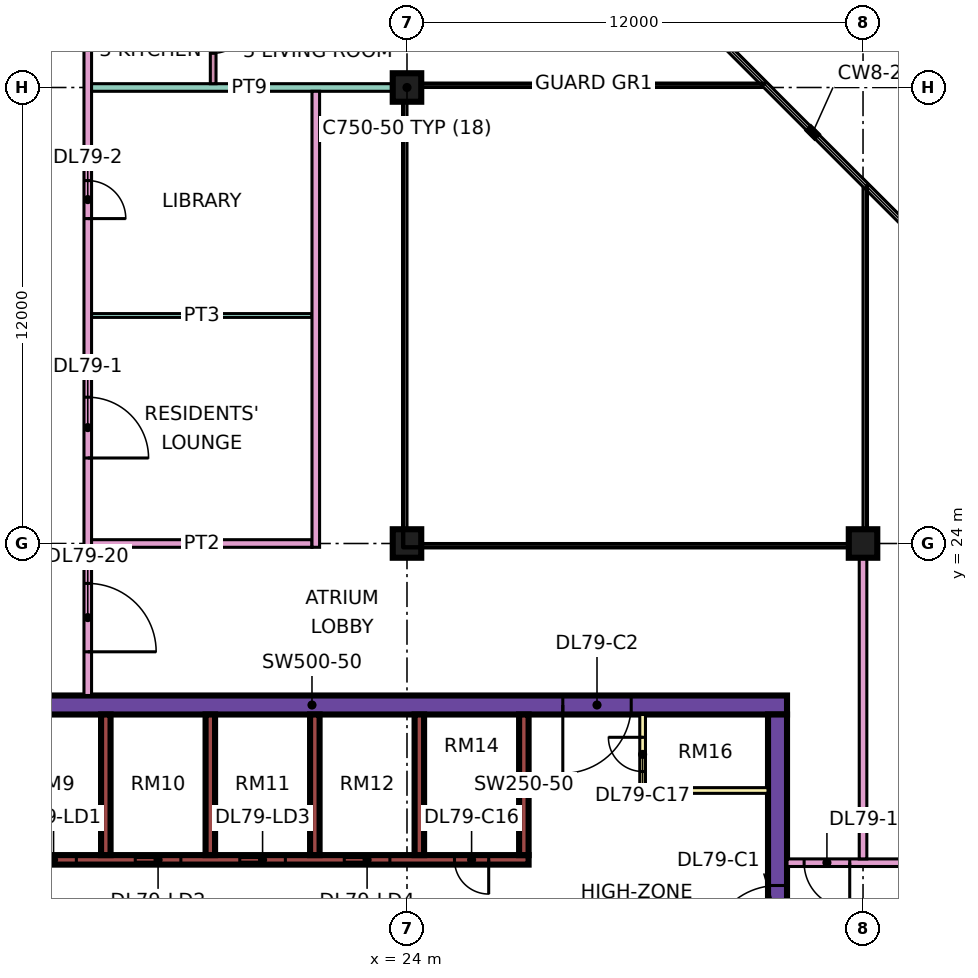
"""IFC4 building model, lengths in metres.
Left out: names, types, materials, properties, quantities, classifications, styles, units other than length and angle.
Written with IfcOpenShell. Run it as: python <this file> out.ifc"""

import sys

from ifc_helpers import new_model, si_unit, direction, frame, frame_2d, origin, origin_2d, place, context, subcontext, project, spatial, rectangle, extrude, element, fill, save


model = new_model("IFC4")
c1 = context("Model", 3, precision=1e-05, world=origin(), true_north=direction((0.0, 1.0)))
c2 = subcontext(c1, "Body", "Model", "MODEL_VIEW")
j1 = project(units=[si_unit("LENGTHUNIT", "METRE"), si_unit("PLANEANGLEUNIT", "RADIAN")], contexts=[c1])
p1 = place(None, origin())
s1 = spatial("IfcSite", under=j1, at=p1, CompositionType="ELEMENT")
p2 = place(p1, origin())
s2 = spatial("IfcBuilding", under=s1, at=p2, CompositionType="ELEMENT")
p3 = place(p2, frame((0.0, 0.0, 342.65)))
s3 = spatial("IfcBuildingStorey", under=s2, at=p3, CompositionType="ELEMENT", Elevation=342.65)
for number, where, z_axis, x_axis in (
    (1, (24.0, 24.0, 0.0), (0.0, 0.0, 1.0), (1.0, 0.0, 0.0)),
    (2, (24.0, 36.0, 0.0), (0.0, 0.0, 1.0), (1.0, 0.0, 0.0)),
    (3, (36.0, 24.0, 0.0), (0.0, 0.0, 1.0), (1.0, 0.0, 0.0)),
):
    element("IfcColumn", number, at=place(p3, frame(where, z_axis=z_axis, x_axis=x_axis)), inside=s3, PredefinedType="COLUMN", context=c2, shape_type="SweptSolid", body=[
        extrude(rectangle(XDim=0.75, YDim=0.75, at=origin_2d()), origin(), (0.0, 0.0, 1.0), 3.75),
    ])
p4 = place(p3, frame((9.0, 19.75, 0.0), z_axis=(0.0, 0.0, 1.0), x_axis=(1.0, 0.0, 0.0)))
e4 = element("IfcWall", 4, at=p4, inside=s3, PredefinedType="SHEAR", context=c2, shape_type="SweptSolid", body=[
    extrude(rectangle(XDim=25.0, YDim=0.5, at=frame_2d((12.5, 0.0))), origin(), (0.0, 0.0, 1.0), 3.75),
])
p5 = place(p4, frame((19.1, 0.0, 0.0)))
e5 = element("IfcOpeningElement", 5, at=p5, cuts=e4, PredefinedType="OPENING", context=c2, shape_type="SweptSolid", body=[
    extrude(rectangle(XDim=1.8, YDim=2.4, at=frame_2d((0.9, 1.2))), frame((0.0, 0.26, 0.0), z_axis=(0.0, -1.0, 0.0), x_axis=(1.0, 0.0, 0.0)), (0.0, 0.0, 1.0), 0.52),
])
p6 = place(p3, frame((33.75, 7.5, 0.0), z_axis=(0.0, 0.0, 1.0), x_axis=(0.0, 1.0, 0.0)))
e6 = element("IfcWall", 6, at=p6, inside=s3, PredefinedType="SHEAR", context=c2, shape_type="SweptSolid", body=[
    extrude(rectangle(XDim=12.0, YDim=0.5, at=frame_2d((6.0, 0.0))), origin(), (0.0, 0.0, 1.0), 3.75),
])
p7 = place(p6, frame((5.7, 0.0, 0.0)))
e7 = element("IfcOpeningElement", 7, at=p7, cuts=e6, PredefinedType="OPENING", context=c2, shape_type="SweptSolid", body=[
    extrude(rectangle(XDim=1.8, YDim=2.4, at=frame_2d((0.9, 1.2))), frame((0.0, 0.26, 0.0), z_axis=(0.0, -1.0, 0.0), x_axis=(1.0, 0.0, 0.0)), (0.0, 0.0, 1.0), 0.52),
])
p8 = place(p3, frame((13.45, 15.675, 0.0), z_axis=(0.0, 0.0, 1.0), x_axis=(1.0, 0.0, 0.0)))
e8 = element("IfcWall", 8, at=p8, inside=s3, PredefinedType="SHEAR", context=c2, shape_type="SweptSolid", body=[
    extrude(rectangle(XDim=13.75, YDim=0.25, at=frame_2d((6.875, 0.0))), origin(), (0.0, 0.0, 1.0), 3.75),
])
p9 = place(p8, frame((0.65, 0.0, 0.0)))
e9 = element("IfcOpeningElement", 9, at=p9, cuts=e8, PredefinedType="OPENING", context=c2, shape_type="SweptSolid", body=[
    extrude(rectangle(XDim=1.2, YDim=2.2, at=frame_2d((0.6, 1.1))), frame((0.0, 0.135, 0.0), z_axis=(0.0, -1.0, 0.0), x_axis=(1.0, 0.0, 0.0)), (0.0, 0.0, 1.0), 0.27),
])
p10 = place(p8, frame((3.4, 0.0, 0.0)))
e10 = element("IfcOpeningElement", 10, at=p10, cuts=e8, PredefinedType="OPENING", context=c2, shape_type="SweptSolid", body=[
    extrude(rectangle(XDim=1.2, YDim=2.2, at=frame_2d((0.6, 1.1))), frame((0.0, 0.135, 0.0), z_axis=(0.0, -1.0, 0.0), x_axis=(1.0, 0.0, 0.0)), (0.0, 0.0, 1.0), 0.27),
])
p11 = place(p8, frame((6.15, 0.0, 0.0)))
e11 = element("IfcOpeningElement", 11, at=p11, cuts=e8, PredefinedType="OPENING", context=c2, shape_type="SweptSolid", body=[
    extrude(rectangle(XDim=1.2, YDim=2.2, at=frame_2d((0.6, 1.1))), frame((0.0, 0.135, 0.0), z_axis=(0.0, -1.0, 0.0), x_axis=(1.0, 0.0, 0.0)), (0.0, 0.0, 1.0), 0.27),
])
p12 = place(p8, frame((8.9, 0.0, 0.0)))
e12 = element("IfcOpeningElement", 12, at=p12, cuts=e8, PredefinedType="OPENING", context=c2, shape_type="SweptSolid", body=[
    extrude(rectangle(XDim=1.2, YDim=2.2, at=frame_2d((0.6, 1.1))), frame((0.0, 0.135, 0.0), z_axis=(0.0, -1.0, 0.0), x_axis=(1.0, 0.0, 0.0)), (0.0, 0.0, 1.0), 0.27),
])
p13 = place(p8, frame((11.8, 0.0, 0.0)))
e13 = element("IfcOpeningElement", 13, at=p13, cuts=e8, PredefinedType="OPENING", context=c2, shape_type="SweptSolid", body=[
    extrude(rectangle(XDim=0.9, YDim=2.1, at=frame_2d((0.45, 1.05))), frame((0.0, 0.135, 0.0), z_axis=(0.0, -1.0, 0.0), x_axis=(1.0, 0.0, 0.0)), (0.0, 0.0, 1.0), 0.27),
])
for number, where, z_axis, x_axis in (
    (14, (16.075, 15.8, 0.0), (0.0, 0.0, 1.0), (0.0, 1.0, 0.0)),
    (15, (18.825, 15.8, 0.0), (0.0, 0.0, 1.0), (0.0, 1.0, 0.0)),
    (16, (21.575, 15.8, 0.0), (0.0, 0.0, 1.0), (0.0, 1.0, 0.0)),
    (17, (24.325, 15.8, 0.0), (0.0, 0.0, 1.0), (0.0, 1.0, 0.0)),
    (18, (27.075, 15.8, 0.0), (0.0, 0.0, 1.0), (0.0, 1.0, 0.0)),
):
    element("IfcWall", number, at=place(p3, frame(where, z_axis=z_axis, x_axis=x_axis)), inside=s3, PredefinedType="SHEAR", context=c2, shape_type="SweptSolid", body=[
        extrude(rectangle(XDim=3.7, YDim=0.25, at=frame_2d((1.85, 0.0))), origin(), (0.0, 0.0, 1.0), 3.75),
    ])
p14 = place(p3, frame((30.2, 17.5, 0.0), z_axis=(0.0, 0.0, 1.0), x_axis=(0.0, 1.0, 0.0)))
e19 = element("IfcWall", 19, at=p14, inside=s3, PredefinedType="PARTITIONING", context=c2, shape_type="SweptSolid", body=[
    extrude(rectangle(XDim=2.0, YDim=0.15, at=frame_2d((1.0, 0.0))), origin(), (0.0, 0.0, 1.0), 3.35),
])
p15 = place(p14, frame((0.5, 0.0, 0.0)))
e20 = element("IfcOpeningElement", 20, at=p15, cuts=e19, PredefinedType="OPENING", context=c2, shape_type="SweptSolid", body=[
    extrude(rectangle(XDim=0.9, YDim=2.1, at=frame_2d((0.45, 1.05))), frame((0.0, 0.085, 0.0), z_axis=(0.0, -1.0, 0.0), x_axis=(1.0, 0.0, 0.0)), (0.0, 0.0, 1.0), 0.17),
])
p16 = place(p3, frame((30.2, 17.5, 0.0), z_axis=(0.0, 0.0, 1.0), x_axis=(1.0, 0.0, 0.0)))
e21 = element("IfcWall", 21, at=p16, inside=s3, PredefinedType="PARTITIONING", context=c2, shape_type="SweptSolid", body=[
    extrude(rectangle(XDim=3.3, YDim=0.15, at=frame_2d((1.65, 0.0))), origin(), (0.0, 0.0, 1.0), 3.35),
])
p17 = place(p3, frame((15.6, 20.0, 0.0), z_axis=(0.0, 0.0, 1.0), x_axis=(0.0, 1.0, 0.0)))
e22 = element("IfcWall", 22, at=p17, inside=s3, PredefinedType="PARTITIONING", context=c2, shape_type="SweptSolid", body=[
    extrude(rectangle(XDim=27.775, YDim=0.2, at=frame_2d((13.887, 0.0))), origin(), (0.0, 0.0, 1.0), 3.35),
])
p18 = place(p17, frame((6.25, 0.0, 0.0)))
e23 = element("IfcOpeningElement", 23, at=p18, cuts=e22, PredefinedType="OPENING", context=c2, shape_type="SweptSolid", body=[
    extrude(rectangle(XDim=1.6, YDim=2.1, at=frame_2d((0.8, 1.05))), frame((0.0, 0.11, 0.0), z_axis=(0.0, -1.0, 0.0), x_axis=(1.0, 0.0, 0.0)), (0.0, 0.0, 1.0), 0.22),
])
p19 = place(p17, frame((12.55, 0.0, 0.0)))
e24 = element("IfcOpeningElement", 24, at=p19, cuts=e22, PredefinedType="OPENING", context=c2, shape_type="SweptSolid", body=[
    extrude(rectangle(XDim=1.0, YDim=2.1, at=frame_2d((0.5, 1.05))), frame((0.0, 0.11, 0.0), z_axis=(0.0, -1.0, 0.0), x_axis=(1.0, 0.0, 0.0)), (0.0, 0.0, 1.0), 0.22),
])
p20 = place(p17, frame((22.9, 0.0, 0.0)))
e25 = element("IfcOpeningElement", 25, at=p20, cuts=e22, PredefinedType="OPENING", context=c2, shape_type="SweptSolid", body=[
    extrude(rectangle(XDim=1.0, YDim=2.1, at=frame_2d((0.5, 1.05))), frame((0.0, 0.11, 0.0), z_axis=(0.0, -1.0, 0.0), x_axis=(1.0, 0.0, 0.0)), (0.0, 0.0, 1.0), 0.22),
])
p21 = place(p17, frame((1.15, 0.0, 0.0)))
e26 = element("IfcOpeningElement", 26, at=p21, cuts=e22, PredefinedType="OPENING", context=c2, shape_type="SweptSolid", body=[
    extrude(rectangle(XDim=1.8, YDim=2.1, at=frame_2d((0.9, 1.05))), frame((0.0, 0.11, 0.0), z_axis=(0.0, -1.0, 0.0), x_axis=(1.0, 0.0, 0.0)), (0.0, 0.0, 1.0), 0.22),
])
p22 = place(p17, frame((25.9, 0.0, 0.0)))
e27 = element("IfcOpeningElement", 27, at=p22, cuts=e22, PredefinedType="OPENING", context=c2, shape_type="SweptSolid", body=[
    extrude(rectangle(XDim=1.0, YDim=2.1, at=frame_2d((0.5, 1.05))), frame((0.0, 0.11, 0.0), z_axis=(0.0, -1.0, 0.0), x_axis=(1.0, 0.0, 0.0)), (0.0, 0.0, 1.0), 0.22),
])
p23 = place(p3, frame((15.7, 24.0, 0.0), z_axis=(0.0, 0.0, 1.0), x_axis=(1.0, 0.0, 0.0)))
e28 = element("IfcWall", 28, at=p23, inside=s3, PredefinedType="PARTITIONING", context=c2, shape_type="SweptSolid", body=[
    extrude(rectangle(XDim=5.8, YDim=0.2, at=frame_2d((2.9, 0.0))), origin(), (0.0, 0.0, 1.0), 3.35),
])
p24 = place(p3, frame((15.7, 30.0, 0.0), z_axis=(0.0, 0.0, 1.0), x_axis=(1.0, 0.0, 0.0)))
e29 = element("IfcWall", 29, at=p24, inside=s3, PredefinedType="PARTITIONING", context=c2, shape_type="SweptSolid", body=[
    extrude(rectangle(XDim=5.8, YDim=0.1, at=frame_2d((2.9, 0.0))), origin(), (0.0, 0.0, 1.0), 3.35),
])
p25 = place(p3, frame((15.7, 36.0, 0.0), z_axis=(0.0, 0.0, 1.0), x_axis=(1.0, 0.0, 0.0)))
e30 = element("IfcWall", 30, at=p25, inside=s3, PredefinedType="PARTITIONING", context=c2, shape_type="SweptSolid", body=[
    extrude(rectangle(XDim=8.3, YDim=0.2, at=frame_2d((4.15, 0.0))), origin(), (0.0, 0.0, 1.0), 3.35),
])
p26 = place(p3, frame((18.9, 36.1, 0.0), z_axis=(0.0, 0.0, 1.0), x_axis=(0.0, 1.0, 0.0)))
e31 = element("IfcWall", 31, at=p26, inside=s3, PredefinedType="PARTITIONING", context=c2, shape_type="SweptSolid", body=[
    extrude(rectangle(XDim=5.675, YDim=0.15, at=frame_2d((2.837, 0.0))), origin(), (0.0, 0.0, 1.0), 3.35),
])
p27 = place(p26, frame((0.8, 0.0, 0.0)))
e32 = element("IfcOpeningElement", 32, at=p27, cuts=e31, PredefinedType="OPENING", context=c2, shape_type="SweptSolid", body=[
    extrude(rectangle(XDim=0.9, YDim=2.1, at=frame_2d((0.45, 1.05))), frame((0.0, 0.085, 0.0), z_axis=(0.0, -1.0, 0.0), x_axis=(1.0, 0.0, 0.0)), (0.0, 0.0, 1.0), 0.17),
])
p28 = place(p3, frame((21.6, 23.9, 0.0), z_axis=(0.0, 0.0, 1.0), x_axis=(0.0, 1.0, 0.0)))
e33 = element("IfcWall", 33, at=p28, inside=s3, PredefinedType="PARTITIONING", context=c2, shape_type="SweptSolid", body=[
    extrude(rectangle(XDim=12.0, YDim=0.2, at=frame_2d((6.0, 0.0))), origin(), (0.0, 0.0, 1.0), 3.35),
])
p29 = place(p3, frame((34.0, 15.6, 0.0), z_axis=(0.0, 0.0, 1.0), x_axis=(1.0, 0.0, 0.0)))
e34 = element("IfcWall", 34, at=p29, inside=s3, PredefinedType="PARTITIONING", context=c2, shape_type="SweptSolid", body=[
    extrude(rectangle(XDim=10.35, YDim=0.2, at=frame_2d((5.175, 0.0))), origin(), (0.0, 0.0, 1.0), 3.35),
])
p30 = place(p29, frame((5.6, 0.0, 0.0)))
e35 = element("IfcOpeningElement", 35, at=p30, cuts=e34, PredefinedType="OPENING", context=c2, shape_type="SweptSolid", body=[
    extrude(rectangle(XDim=1.0, YDim=2.1, at=frame_2d((0.5, 1.05))), frame((0.0, 0.11, 0.0), z_axis=(0.0, -1.0, 0.0), x_axis=(1.0, 0.0, 0.0)), (0.0, 0.0, 1.0), 0.22),
])
p31 = place(p29, frame((0.45, 0.0, 0.0)))
e36 = element("IfcOpeningElement", 36, at=p31, cuts=e34, PredefinedType="OPENING", context=c2, shape_type="SweptSolid", body=[
    extrude(rectangle(XDim=1.2, YDim=2.1, at=frame_2d((0.6, 1.05))), frame((0.0, 0.11, 0.0), z_axis=(0.0, -1.0, 0.0), x_axis=(1.0, 0.0, 0.0)), (0.0, 0.0, 1.0), 0.22),
])
p32 = place(p3, frame((36.0, 15.7, 0.0), z_axis=(0.0, 0.0, 1.0), x_axis=(0.0, 1.0, 0.0)))
e37 = element("IfcWall", 37, at=p32, inside=s3, PredefinedType="PARTITIONING", context=c2, shape_type="SweptSolid", body=[
    extrude(rectangle(XDim=8.3, YDim=0.2, at=frame_2d((4.15, 0.0))), origin(), (0.0, 0.0, 1.0), 3.35),
])
p33 = place(p9, origin())
e38 = element("IfcDoor", 38, at=p33, inside=s3, OperationType="DOUBLE_DOOR_SLIDING", PredefinedType="DOOR", context=c2, shape_type="SweptSolid", body=[
    extrude(rectangle(XDim=1.2, YDim=2.2, at=frame_2d((0.6, 1.1))), frame((0.0, 0.025, 0.0), z_axis=(0.0, -1.0, 0.0), x_axis=(1.0, 0.0, 0.0)), (0.0, 0.0, 1.0), 0.05),
])
fill(e9, e38)
p34 = place(p10, origin())
e39 = element("IfcDoor", 39, at=p34, inside=s3, OperationType="DOUBLE_DOOR_SLIDING", PredefinedType="DOOR", context=c2, shape_type="SweptSolid", body=[
    extrude(rectangle(XDim=1.2, YDim=2.2, at=frame_2d((0.6, 1.1))), frame((0.0, 0.025, 0.0), z_axis=(0.0, -1.0, 0.0), x_axis=(1.0, 0.0, 0.0)), (0.0, 0.0, 1.0), 0.05),
])
fill(e10, e39)
p35 = place(p11, origin())
e40 = element("IfcDoor", 40, at=p35, inside=s3, OperationType="DOUBLE_DOOR_SLIDING", PredefinedType="DOOR", context=c2, shape_type="SweptSolid", body=[
    extrude(rectangle(XDim=1.2, YDim=2.2, at=frame_2d((0.6, 1.1))), frame((0.0, 0.025, 0.0), z_axis=(0.0, -1.0, 0.0), x_axis=(1.0, 0.0, 0.0)), (0.0, 0.0, 1.0), 0.05),
])
fill(e11, e40)
p36 = place(p12, origin())
e41 = element("IfcDoor", 41, at=p36, inside=s3, OperationType="DOUBLE_DOOR_SLIDING", PredefinedType="DOOR", context=c2, shape_type="SweptSolid", body=[
    extrude(rectangle(XDim=1.2, YDim=2.2, at=frame_2d((0.6, 1.1))), frame((0.0, 0.025, 0.0), z_axis=(0.0, -1.0, 0.0), x_axis=(1.0, 0.0, 0.0)), (0.0, 0.0, 1.0), 0.05),
])
fill(e12, e41)
p37 = place(p7, origin())
e42 = element("IfcDoor", 42, at=p37, inside=s3, OperationType="DOUBLE_DOOR_SINGLE_SWING", PredefinedType="DOOR", context=c2, shape_type="SweptSolid", body=[
    extrude(rectangle(XDim=1.8, YDim=2.4, at=frame_2d((0.9, 1.2))), frame((0.0, 0.025, 0.0), z_axis=(0.0, -1.0, 0.0), x_axis=(1.0, 0.0, 0.0)), (0.0, 0.0, 1.0), 0.05),
])
fill(e7, e42)
p38 = place(p5, frame((1.8, 0.0, 0.0), z_axis=(0.0, 0.0, 1.0), x_axis=(-1.0, 0.0, 0.0)))
e43 = element("IfcDoor", 43, at=p38, inside=s3, OperationType="DOUBLE_DOOR_SINGLE_SWING", PredefinedType="DOOR", context=c2, shape_type="SweptSolid", body=[
    extrude(rectangle(XDim=1.8, YDim=2.4, at=frame_2d((0.9, 1.2))), frame((0.0, 0.025, 0.0), z_axis=(0.0, -1.0, 0.0), x_axis=(1.0, 0.0, 0.0)), (0.0, 0.0, 1.0), 0.05),
])
fill(e5, e43)
p39 = place(p13, origin())
e44 = element("IfcDoor", 44, at=p39, inside=s3, OperationType="SINGLE_SWING_RIGHT", PredefinedType="DOOR", context=c2, shape_type="SweptSolid", body=[
    extrude(rectangle(XDim=0.9, YDim=2.1, at=frame_2d((0.45, 1.05))), frame((0.0, 0.025, 0.0), z_axis=(0.0, -1.0, 0.0), x_axis=(1.0, 0.0, 0.0)), (0.0, 0.0, 1.0), 0.05),
])
fill(e13, e44)
p40 = place(p15, frame((0.9, 0.0, 0.0), z_axis=(0.0, 0.0, 1.0), x_axis=(-1.0, 0.0, 0.0)))
e45 = element("IfcDoor", 45, at=p40, inside=s3, OperationType="SINGLE_SWING_RIGHT", PredefinedType="DOOR", context=c2, shape_type="SweptSolid", body=[
    extrude(rectangle(XDim=0.9, YDim=2.1, at=frame_2d((0.45, 1.05))), frame((0.0, 0.025, 0.0), z_axis=(0.0, -1.0, 0.0), x_axis=(1.0, 0.0, 0.0)), (0.0, 0.0, 1.0), 0.05),
])
fill(e20, e45)
p41 = place(p18, frame((1.6, 0.0, 0.0), z_axis=(0.0, 0.0, 1.0), x_axis=(-1.0, 0.0, 0.0)))
e46 = element("IfcDoor", 46, at=p41, inside=s3, OperationType="DOUBLE_DOOR_SINGLE_SWING", PredefinedType="DOOR", context=c2, shape_type="SweptSolid", body=[
    extrude(rectangle(XDim=1.6, YDim=2.1, at=frame_2d((0.8, 1.05))), frame((0.0, 0.025, 0.0), z_axis=(0.0, -1.0, 0.0), x_axis=(1.0, 0.0, 0.0)), (0.0, 0.0, 1.0), 0.05),
])
fill(e23, e46)
p42 = place(p19, frame((1.0, 0.0, 0.0), z_axis=(0.0, 0.0, 1.0), x_axis=(-1.0, 0.0, 0.0)))
e47 = element("IfcDoor", 47, at=p42, inside=s3, OperationType="SINGLE_SWING_LEFT", PredefinedType="DOOR", context=c2, shape_type="SweptSolid", body=[
    extrude(rectangle(XDim=1.0, YDim=2.1, at=frame_2d((0.5, 1.05))), frame((0.0, 0.025, 0.0), z_axis=(0.0, -1.0, 0.0), x_axis=(1.0, 0.0, 0.0)), (0.0, 0.0, 1.0), 0.05),
])
fill(e24, e47)
p43 = place(p27, origin())
e48 = element("IfcDoor", 48, at=p43, inside=s3, OperationType="SINGLE_SWING_RIGHT", PredefinedType="DOOR", context=c2, shape_type="SweptSolid", body=[
    extrude(rectangle(XDim=0.9, YDim=2.1, at=frame_2d((0.45, 1.05))), frame((0.0, 0.025, 0.0), z_axis=(0.0, -1.0, 0.0), x_axis=(1.0, 0.0, 0.0)), (0.0, 0.0, 1.0), 0.05),
])
fill(e32, e48)
p44 = place(p31, origin())
e49 = element("IfcDoor", 49, at=p44, inside=s3, OperationType="SINGLE_SWING_RIGHT", PredefinedType="DOOR", context=c2, shape_type="SweptSolid", body=[
    extrude(rectangle(XDim=1.2, YDim=2.1, at=frame_2d((0.6, 1.05))), frame((0.0, 0.025, 0.0), z_axis=(0.0, -1.0, 0.0), x_axis=(1.0, 0.0, 0.0)), (0.0, 0.0, 1.0), 0.05),
])
fill(e36, e49)
p45 = place(p21, frame((1.8, 0.0, 0.0), z_axis=(0.0, 0.0, 1.0), x_axis=(-1.0, 0.0, 0.0)))
e50 = element("IfcDoor", 50, at=p45, inside=s3, OperationType="DOUBLE_DOOR_SINGLE_SWING", PredefinedType="DOOR", context=c2, shape_type="SweptSolid", body=[
    extrude(rectangle(XDim=1.8, YDim=2.1, at=frame_2d((0.9, 1.05))), frame((0.0, 0.025, 0.0), z_axis=(0.0, -1.0, 0.0), x_axis=(1.0, 0.0, 0.0)), (0.0, 0.0, 1.0), 0.05),
])
fill(e26, e50)
save(model, sys.argv[1])
